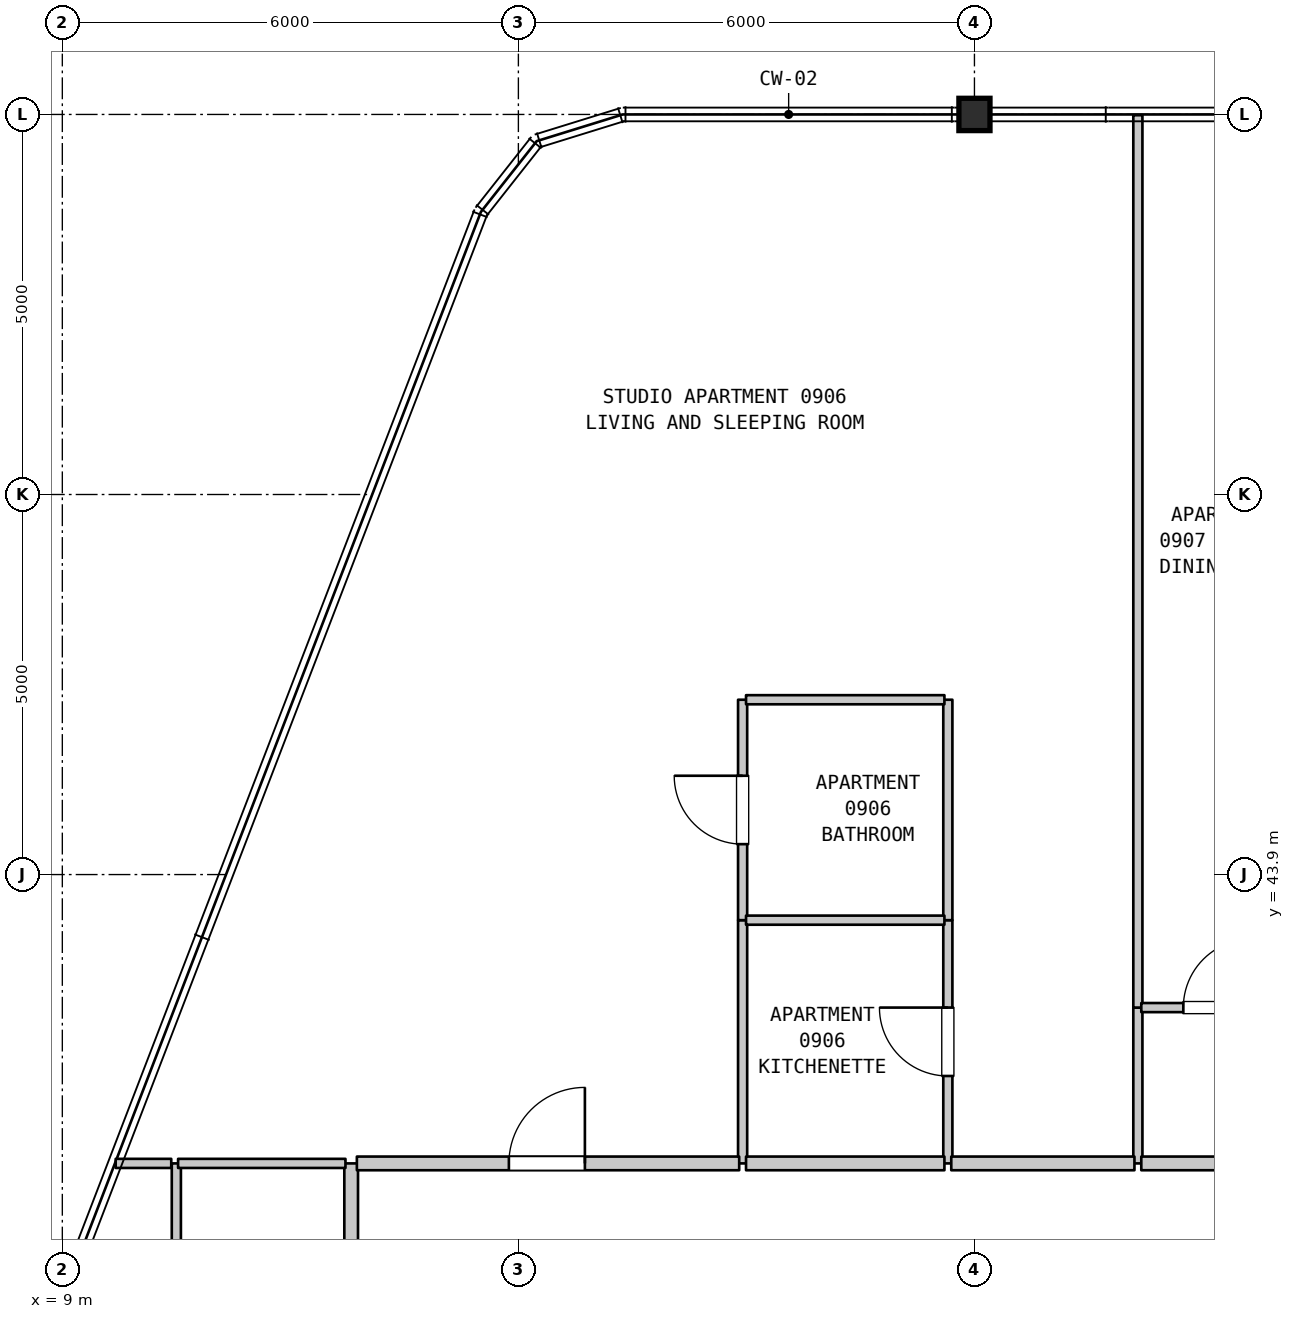
"""IFC4 building model, lengths in metres.
Left out: names, types, materials, properties, quantities, classifications, styles, units other than length and angle.
Written with IfcOpenShell. Run it as: python <this file> out.ifc"""

import sys

from ifc_helpers import new_model, si_unit, direction, frame, frame_2d, origin, origin_2d, place, context, subcontext, project, spatial, rectangle, i_section, extrude, element, fill, save


model = new_model("IFC4")
c1 = context("Model", 3, precision=1e-05, world=origin(), true_north=direction((0.0, 1.0)))
c2 = subcontext(c1, "Body", "Model", "MODEL_VIEW")
j1 = project(units=[si_unit("LENGTHUNIT", "METRE"), si_unit("PLANEANGLEUNIT", "RADIAN")], contexts=[c1])
p1 = place(None, origin())
s1 = spatial("IfcSite", under=j1, at=p1, CompositionType="ELEMENT")
p2 = place(p1, origin())
s2 = spatial("IfcBuilding", under=s1, at=p2, CompositionType="ELEMENT")
p3 = place(p2, frame((0.0, 0.0, 42.5)))
s3 = spatial("IfcBuildingStorey", under=s2, at=p3, CompositionType="ELEMENT", Elevation=42.5)
p4 = place(p3, frame((21.0, 53.9, 0.0), z_axis=(0.0, 0.0, 1.0), x_axis=(1.0, 0.0, 0.0)))
e1 = element("IfcColumn", 1, at=p4, inside=s3, PredefinedType="COLUMN", context=c2, shape_type="SweptSolid", body=[
    extrude(i_section(OverallWidth=0.409, OverallDepth=0.425, WebThickness=0.032, FlangeThickness=0.052, FilletRadius=0.015, at=origin_2d()), origin(), (0.0, 0.0, 1.0), 3.7),
])
p5 = place(p3, frame((10.5, 31.45, 0.0), z_axis=(0.0, 0.0, 1.0), x_axis=(0.0, 1.0, 0.0)))
e2 = element("IfcWall", 2, at=p5, inside=s3, PredefinedType="PARTITIONING", context=c2, shape_type="SweptSolid", body=[
    extrude(rectangle(XDim=8.65, YDim=0.12, at=frame_2d((4.325, 0.0))), origin(), (0.0, 0.0, 1.0), 3.385),
])
p6 = place(p3, frame((12.8, 31.45, 0.0), z_axis=(0.0, 0.0, 1.0), x_axis=(0.0, 1.0, 0.0)))
e3 = element("IfcWall", 3, at=p6, inside=s3, PredefinedType="STANDARD", context=c2, shape_type="SweptSolid", body=[
    extrude(rectangle(XDim=8.65, YDim=0.18, at=frame_2d((4.325, 0.0))), origin(), (0.0, 0.0, 1.0), 3.385),
])
p7 = place(p3, frame((17.95, 40.1, 0.0), z_axis=(0.0, 0.0, 1.0), x_axis=(0.0, 1.0, 0.0)))
e4 = element("IfcWall", 4, at=p7, inside=s3, PredefinedType="PARTITIONING", context=c2, shape_type="SweptSolid", body=[
    extrude(rectangle(XDim=3.2, YDim=0.12, at=frame_2d((1.6, 0.0))), origin(), (0.0, 0.0, 1.0), 3.385),
])
p8 = place(p3, frame((17.95, 43.3, 0.0), z_axis=(0.0, 0.0, 1.0), x_axis=(0.0, 1.0, 0.0)))
e5 = element("IfcWall", 5, at=p8, inside=s3, PredefinedType="PARTITIONING", context=c2, shape_type="SweptSolid", body=[
    extrude(rectangle(XDim=2.9, YDim=0.12, at=frame_2d((1.45, 0.0))), origin(), (0.0, 0.0, 1.0), 3.385),
])
p9 = place(p8, frame((1.0, 0.0, 0.0)))
e6 = element("IfcOpeningElement", 6, at=p9, cuts=e5, PredefinedType="OPENING", context=c2, shape_type="SweptSolid", body=[
    extrude(rectangle(XDim=0.9, YDim=2.1, at=frame_2d((0.45, 1.05))), frame((0.0, 0.07, 0.0), z_axis=(0.0, -1.0, 0.0), x_axis=(1.0, 0.0, 0.0)), (0.0, 0.0, 1.0), 0.14),
])
p10 = place(p3, frame((20.65, 40.1, 0.0), z_axis=(0.0, 0.0, 1.0), x_axis=(0.0, 1.0, 0.0)))
e7 = element("IfcWall", 7, at=p10, inside=s3, PredefinedType="PARTITIONING", context=c2, shape_type="SweptSolid", body=[
    extrude(rectangle(XDim=3.2, YDim=0.12, at=frame_2d((1.6, 0.0))), origin(), (0.0, 0.0, 1.0), 3.385),
])
p11 = place(p10, frame((1.15, 0.0, 0.0)))
e8 = element("IfcOpeningElement", 8, at=p11, cuts=e7, PredefinedType="OPENING", context=c2, shape_type="SweptSolid", body=[
    extrude(rectangle(XDim=0.9, YDim=2.15, at=frame_2d((0.45, 1.075))), frame((0.0, 0.07, 0.0), z_axis=(0.0, -1.0, 0.0), x_axis=(1.0, 0.0, 0.0)), (0.0, 0.0, 1.0), 0.14),
])
p12 = place(p3, frame((20.65, 43.3, 0.0), z_axis=(0.0, 0.0, 1.0), x_axis=(0.0, 1.0, 0.0)))
e9 = element("IfcWall", 9, at=p12, inside=s3, PredefinedType="PARTITIONING", context=c2, shape_type="SweptSolid", body=[
    extrude(rectangle(XDim=2.9, YDim=0.12, at=frame_2d((1.45, 0.0))), origin(), (0.0, 0.0, 1.0), 3.385),
])
p13 = place(p3, frame((23.15, 40.1, 0.0), z_axis=(0.0, 0.0, 1.0), x_axis=(0.0, 1.0, 0.0)))
e10 = element("IfcWall", 10, at=p13, inside=s3, PredefinedType="PARTITIONING", context=c2, shape_type="SweptSolid", body=[
    extrude(rectangle(XDim=2.05, YDim=0.12, at=frame_2d((1.025, 0.0))), origin(), (0.0, 0.0, 1.0), 3.385),
])
p14 = place(p3, frame((23.15, 42.15, 0.0), z_axis=(0.0, 0.0, 1.0), x_axis=(0.0, 1.0, 0.0)))
e11 = element("IfcWall", 11, at=p14, inside=s3, PredefinedType="PARTITIONING", context=c2, shape_type="SweptSolid", body=[
    extrude(rectangle(XDim=11.74, YDim=0.12, at=frame_2d((5.87, 0.0))), origin(), (0.0, 0.0, 1.0), 3.385),
])
p15 = place(p3, frame((9.702, 40.1, 0.0), z_axis=(0.0, 0.0, 1.0), x_axis=(1.0, 0.0, 0.0)))
e12 = element("IfcWall", 12, at=p15, inside=s3, PredefinedType="PARTITIONING", context=c2, shape_type="SweptSolid", body=[
    extrude(rectangle(XDim=0.731, YDim=0.12, at=frame_2d((0.366, 0.0))), origin(), (0.0, 0.0, 1.0), 3.385),
])
p16 = place(p3, frame((10.523, 40.1, 0.0), z_axis=(0.0, 0.0, 1.0), x_axis=(1.0, 0.0, 0.0)))
e13 = element("IfcWall", 13, at=p16, inside=s3, PredefinedType="PARTITIONING", context=c2, shape_type="SweptSolid", body=[
    extrude(rectangle(XDim=2.202, YDim=0.12, at=frame_2d((1.101, 0.0))), origin(), (0.0, 0.0, 1.0), 3.385),
])
p17 = place(p3, frame((12.875, 40.1, 0.0), z_axis=(0.0, 0.0, 1.0), x_axis=(1.0, 0.0, 0.0)))
e14 = element("IfcWall", 14, at=p17, inside=s3, PredefinedType="STANDARD", context=c2, shape_type="SweptSolid", body=[
    extrude(rectangle(XDim=5.03, YDim=0.18, at=frame_2d((2.515, 0.0))), origin(), (0.0, 0.0, 1.0), 3.385),
])
p18 = place(p17, frame((2.0, 0.0, 0.0)))
e15 = element("IfcOpeningElement", 15, at=p18, cuts=e14, PredefinedType="OPENING", context=c2, shape_type="SweptSolid", body=[
    extrude(rectangle(XDim=1.0, YDim=2.15, at=frame_2d((0.5, 1.075))), frame((0.0, 0.1, 0.0), z_axis=(0.0, -1.0, 0.0), x_axis=(1.0, 0.0, 0.0)), (0.0, 0.0, 1.0), 0.2),
])
p19 = place(p3, frame((17.995, 40.1, 0.0), z_axis=(0.0, 0.0, 1.0), x_axis=(1.0, 0.0, 0.0)))
e16 = element("IfcWall", 16, at=p19, inside=s3, PredefinedType="STANDARD", context=c2, shape_type="SweptSolid", body=[
    extrude(rectangle(XDim=2.61, YDim=0.18, at=frame_2d((1.305, 0.0))), origin(), (0.0, 0.0, 1.0), 3.385),
])
p20 = place(p3, frame((20.695, 40.1, 0.0), z_axis=(0.0, 0.0, 1.0), x_axis=(1.0, 0.0, 0.0)))
e17 = element("IfcWall", 17, at=p20, inside=s3, PredefinedType="STANDARD", context=c2, shape_type="SweptSolid", body=[
    extrude(rectangle(XDim=2.41, YDim=0.18, at=frame_2d((1.205, 0.0))), origin(), (0.0, 0.0, 1.0), 3.385),
])
p21 = place(p3, frame((23.195, 40.1, 0.0), z_axis=(0.0, 0.0, 1.0), x_axis=(1.0, 0.0, 0.0)))
e18 = element("IfcWall", 18, at=p21, inside=s3, PredefinedType="STANDARD", context=c2, shape_type="SweptSolid", body=[
    extrude(rectangle(XDim=5.04, YDim=0.18, at=frame_2d((2.52, 0.0))), origin(), (0.0, 0.0, 1.0), 3.385),
])
p22 = place(p21, frame((1.75, 0.0, 0.0)))
e19 = element("IfcOpeningElement", 19, at=p22, cuts=e18, PredefinedType="OPENING", context=c2, shape_type="SweptSolid", body=[
    extrude(rectangle(XDim=1.0, YDim=2.15, at=frame_2d((0.5, 1.075))), frame((0.0, 0.1, 0.0), z_axis=(0.0, -1.0, 0.0), x_axis=(1.0, 0.0, 0.0)), (0.0, 0.0, 1.0), 0.2),
])
p23 = place(p3, frame((23.195, 42.15, 0.0), z_axis=(0.0, 0.0, 1.0), x_axis=(1.0, 0.0, 0.0)))
e20 = element("IfcWall", 20, at=p23, inside=s3, PredefinedType="PARTITIONING", context=c2, shape_type="SweptSolid", body=[
    extrude(rectangle(XDim=2.16, YDim=0.12, at=frame_2d((1.08, 0.0))), origin(), (0.0, 0.0, 1.0), 3.385),
])
p24 = place(p23, frame((0.553, 0.0, 0.0)))
e21 = element("IfcOpeningElement", 21, at=p24, cuts=e20, PredefinedType="OPENING", context=c2, shape_type="SweptSolid", body=[
    extrude(rectangle(XDim=0.9, YDim=2.15, at=frame_2d((0.45, 1.075))), frame((0.0, 0.07, 0.0), z_axis=(0.0, -1.0, 0.0), x_axis=(1.0, 0.0, 0.0)), (0.0, 0.0, 1.0), 0.14),
])
for number, where, z_axis, x_axis in (
    (22, (17.995, 43.3, 0.0), (0.0, 0.0, 1.0), (1.0, 0.0, 0.0)),
    (23, (17.995, 46.2, 0.0), (0.0, 0.0, 1.0), (1.0, 0.0, 0.0)),
):
    element("IfcWall", number, at=place(p3, frame(where, z_axis=z_axis, x_axis=x_axis)), inside=s3, PredefinedType="PARTITIONING", context=c2, shape_type="SweptSolid", body=[
        extrude(rectangle(XDim=2.61, YDim=0.12, at=frame_2d((1.305, 0.0))), origin(), (0.0, 0.0, 1.0), 3.385),
    ])
p25 = place(p9, origin())
e24 = element("IfcDoor", 24, at=p25, inside=s3, OperationType="SINGLE_SWING_RIGHT", PredefinedType="DOOR", context=c2, shape_type="SweptSolid", body=[
    extrude(rectangle(XDim=0.9, YDim=2.1, at=frame_2d((0.45, 1.05))), frame((0.0, 0.025, 0.0), z_axis=(0.0, -1.0, 0.0), x_axis=(1.0, 0.0, 0.0)), (0.0, 0.0, 1.0), 0.05),
])
fill(e6, e24)
p26 = place(p11, origin())
e25 = element("IfcDoor", 25, at=p26, inside=s3, OperationType="SINGLE_SWING_RIGHT", PredefinedType="DOOR", context=c2, shape_type="SweptSolid", body=[
    extrude(rectangle(XDim=0.9, YDim=2.15, at=frame_2d((0.45, 1.075))), frame((0.0, 0.025, 0.0), z_axis=(0.0, -1.0, 0.0), x_axis=(1.0, 0.0, 0.0)), (0.0, 0.0, 1.0), 0.05),
])
fill(e8, e25)
p27 = place(p18, origin())
e26 = element("IfcDoor", 26, at=p27, inside=s3, OperationType="SINGLE_SWING_RIGHT", PredefinedType="DOOR", context=c2, shape_type="SweptSolid", body=[
    extrude(rectangle(XDim=1.0, YDim=2.15, at=frame_2d((0.5, 1.075))), frame((0.0, 0.025, 0.0), z_axis=(0.0, -1.0, 0.0), x_axis=(1.0, 0.0, 0.0)), (0.0, 0.0, 1.0), 0.05),
])
fill(e15, e26)
p28 = place(p24, origin())
e27 = element("IfcDoor", 27, at=p28, inside=s3, OperationType="SINGLE_SWING_RIGHT", PredefinedType="DOOR", context=c2, shape_type="SweptSolid", body=[
    extrude(rectangle(XDim=0.9, YDim=2.15, at=frame_2d((0.45, 1.075))), frame((0.0, 0.025, 0.0), z_axis=(0.0, -1.0, 0.0), x_axis=(1.0, 0.0, 0.0)), (0.0, 0.0, 1.0), 0.05),
])
fill(e21, e27)
save(model, sys.argv[1])
